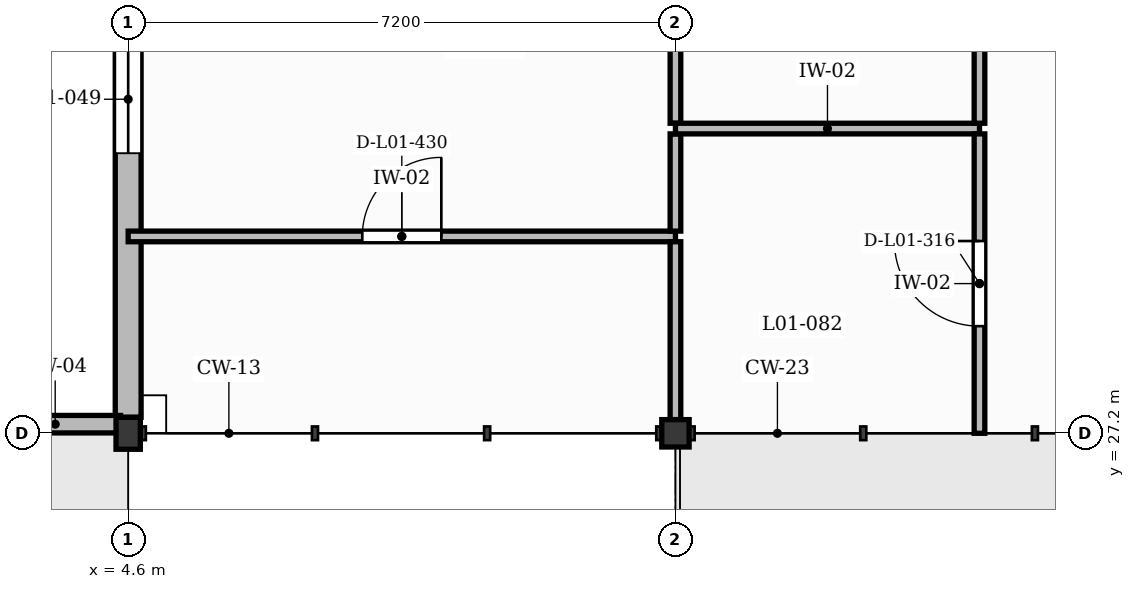
"""IFC4 building model, lengths in metres.
Left out: names, types, materials, properties, quantities, classifications, styles, units other than length and angle.
Written with IfcOpenShell. Run it as: python <this file> out.ifc"""

import sys

from ifc_helpers import new_model, si_unit, direction, frame, frame_2d, origin, origin_2d, place, context, subcontext, project, spatial, rectangle, extrude, element, fill, save


model = new_model("IFC4")
c1 = context("Model", 3, precision=1e-05, world=origin(), true_north=direction((0.0, 1.0)))
c2 = subcontext(c1, "Body", "Model", "MODEL_VIEW")
j1 = project(units=[si_unit("LENGTHUNIT", "METRE"), si_unit("PLANEANGLEUNIT", "RADIAN")], contexts=[c1])
p1 = place(None, origin())
s1 = spatial("IfcSite", under=j1, at=p1, CompositionType="ELEMENT")
p2 = place(p1, origin())
s2 = spatial("IfcBuilding", under=s1, at=p2, CompositionType="ELEMENT")
p3 = place(p2, frame((0.0, 0.0, 4.5)))
s3 = spatial("IfcBuildingStorey", under=s2, at=p3, CompositionType="ELEMENT", Elevation=4.5)
p4 = place(p3, frame((4.6, 27.2, 0.0), z_axis=(0.0, 0.0, 1.0), x_axis=(1.0, 0.0, 0.0)))
e1 = element("IfcColumn", 1, at=p4, inside=s3, PredefinedType="COLUMN", context=c2, shape_type="SweptSolid", body=[
    extrude(rectangle(XDim=0.32, YDim=0.42, at=origin_2d()), origin(), (0.0, 0.0, 1.0), 4.26),
])
p5 = place(p3, frame((11.8, 27.2, 0.0), z_axis=(0.0, 0.0, 1.0), x_axis=(1.0, 0.0, 0.0)))
e2 = element("IfcColumn", 2, at=p5, inside=s3, PredefinedType="COLUMN", context=c2, shape_type="SweptSolid", body=[
    extrude(rectangle(XDim=0.36, YDim=0.36, at=origin_2d()), origin(), (0.0, 0.0, 1.0), 4.26),
])
p6 = place(p3, frame((4.6, 27.41, 0.0), z_axis=(0.0, 0.0, 1.0), x_axis=(0.0, 1.0, 0.0)))
e3 = element("IfcWall", 3, at=p6, inside=s3, PredefinedType="SOLIDWALL", context=c2, shape_type="SweptSolid", body=[
    extrude(rectangle(XDim=9.21, YDim=0.34, at=frame_2d((4.605, 0.0))), origin(), (0.0, 0.0, 1.0), 3.8),
])
p7 = place(p6, frame((3.475, 0.0, 0.9)))
e4 = element("IfcOpeningElement", 4, at=p7, cuts=e3, PredefinedType="OPENING", context=c2, shape_type="SweptSolid", body=[
    extrude(rectangle(XDim=1.42, YDim=2.4, at=frame_2d((0.71, 1.2))), frame((0.0, 0.18, 0.0), z_axis=(0.0, -1.0, 0.0), x_axis=(1.0, 0.0, 0.0)), (0.0, 0.0, 1.0), 0.36),
])
p8 = place(p6, frame((5.575, 0.0, 0.9)))
e5 = element("IfcOpeningElement", 5, at=p8, cuts=e3, PredefinedType="OPENING", context=c2, shape_type="SweptSolid", body=[
    extrude(rectangle(XDim=1.42, YDim=2.4, at=frame_2d((0.71, 1.2))), frame((0.0, 0.18, 0.0), z_axis=(0.0, -1.0, 0.0), x_axis=(1.0, 0.0, 0.0)), (0.0, 0.0, 1.0), 0.36),
])
p9 = place(p3, frame((2.78, 27.32, -0.05), z_axis=(0.0, 0.0, 1.0), x_axis=(1.0, 0.0, 0.0)))
e6 = element("IfcWall", 6, at=p9, inside=s3, PredefinedType="PARAPET", context=c2, shape_type="SweptSolid", body=[
    extrude(rectangle(XDim=1.72, YDim=0.23, at=frame_2d((0.86, 0.0))), origin(), (0.0, 0.0, 1.0), 0.7),
])
p10 = place(p3, frame((4.6, 29.79, 0.0), z_axis=(0.0, 0.0, 1.0), x_axis=(1.0, 0.0, 0.0)))
e7 = element("IfcWall", 7, at=p10, inside=s3, PredefinedType="PARTITIONING", context=c2, shape_type="SweptSolid", body=[
    extrude(rectangle(XDim=7.2, YDim=0.14, at=frame_2d((3.6, 0.0))), origin(), (0.0, 0.0, 1.0), 4.18),
])
p11 = place(p10, frame((3.08, 0.0, 0.0)))
e8 = element("IfcOpeningElement", 8, at=p11, cuts=e7, PredefinedType="OPENING", context=c2, shape_type="SweptSolid", body=[
    extrude(rectangle(XDim=1.04, YDim=2.1, at=frame_2d((0.52, 1.05))), frame((0.0, 0.08, 0.0), z_axis=(0.0, -1.0, 0.0), x_axis=(1.0, 0.0, 0.0)), (0.0, 0.0, 1.0), 0.16),
])
p12 = place(p3, frame((11.8, 27.38, 0.0), z_axis=(0.0, 0.0, 1.0), x_axis=(0.0, 1.0, 0.0)))
e9 = element("IfcWall", 9, at=p12, inside=s3, PredefinedType="PARTITIONING", context=c2, shape_type="SweptSolid", body=[
    extrude(rectangle(XDim=2.34, YDim=0.14, at=frame_2d((1.17, 0.0))), origin(), (0.0, 0.0, 1.0), 3.62),
])
p13 = place(p3, frame((11.8, 29.86, 0.0), z_axis=(0.0, 0.0, 1.0), x_axis=(0.0, 1.0, 0.0)))
e10 = element("IfcWall", 10, at=p13, inside=s3, PredefinedType="PARTITIONING", context=c2, shape_type="SweptSolid", body=[
    extrude(rectangle(XDim=1.279, YDim=0.14, at=frame_2d((0.639, 0.0))), origin(), (0.0, 0.0, 1.0), 3.62),
])
p14 = place(p3, frame((11.8, 31.279, 0.0), z_axis=(0.0, 0.0, 1.0), x_axis=(0.0, 1.0, 0.0)))
e11 = element("IfcWall", 11, at=p14, inside=s3, PredefinedType="PARTITIONING", context=c2, shape_type="SweptSolid", body=[
    extrude(rectangle(XDim=4.151, YDim=0.14, at=frame_2d((2.075, 0.0))), origin(), (0.0, 0.0, 1.0), 3.62),
])
p15 = place(p3, frame((11.8, 31.209, 0.0), z_axis=(0.0, 0.0, 1.0), x_axis=(1.0, 0.0, 0.0)))
e12 = element("IfcWall", 12, at=p15, inside=s3, PredefinedType="PARTITIONING", context=c2, shape_type="SweptSolid", body=[
    extrude(rectangle(XDim=4.0, YDim=0.14, at=frame_2d((2.0, 0.0))), origin(), (0.0, 0.0, 1.0), 4.18),
])
p16 = place(p3, frame((15.8, 27.2, 0.0), z_axis=(0.0, 0.0, 1.0), x_axis=(0.0, 1.0, 0.0)))
e13 = element("IfcWall", 13, at=p16, inside=s3, PredefinedType="PARTITIONING", context=c2, shape_type="SweptSolid", body=[
    extrude(rectangle(XDim=3.939, YDim=0.14, at=frame_2d((1.969, 0.0))), origin(), (0.0, 0.0, 1.0), 4.18),
])
p17 = place(p16, frame((1.409, 0.0, 0.0)))
e14 = element("IfcOpeningElement", 14, at=p17, cuts=e13, PredefinedType="OPENING", context=c2, shape_type="SweptSolid", body=[
    extrude(rectangle(XDim=1.12, YDim=2.15, at=frame_2d((0.56, 1.075))), frame((0.0, 0.08, 0.0), z_axis=(0.0, -1.0, 0.0), x_axis=(1.0, 0.0, 0.0)), (0.0, 0.0, 1.0), 0.16),
])
p18 = place(p3, frame((15.8, 31.279, 0.0), z_axis=(0.0, 0.0, 1.0), x_axis=(0.0, 1.0, 0.0)))
e15 = element("IfcWall", 15, at=p18, inside=s3, PredefinedType="PARTITIONING", context=c2, shape_type="SweptSolid", body=[
    extrude(rectangle(XDim=4.151, YDim=0.14, at=frame_2d((2.075, 0.0))), origin(), (0.0, 0.0, 1.0), 4.18),
])
p19 = place(p7, origin())
e16 = element("IfcWindow", 16, at=p19, inside=s3, PartitioningType="SINGLE_PANEL", PredefinedType="WINDOW", context=c2, shape_type="SweptSolid", body=[
    extrude(rectangle(XDim=1.42, YDim=2.4, at=frame_2d((0.71, 1.2))), frame((0.0, 0.03, 0.0), z_axis=(0.0, -1.0, 0.0), x_axis=(1.0, 0.0, 0.0)), (0.0, 0.0, 1.0), 0.06),
])
fill(e4, e16)
p20 = place(p17, origin())
e17 = element("IfcDoor", 17, at=p20, inside=s3, OperationType="SINGLE_SWING_RIGHT", PredefinedType="DOOR", context=c2, shape_type="SweptSolid", body=[
    extrude(rectangle(XDim=1.12, YDim=2.15, at=frame_2d((0.56, 1.075))), frame((0.0, 0.025, 0.0), z_axis=(0.0, -1.0, 0.0), x_axis=(1.0, 0.0, 0.0)), (0.0, 0.0, 1.0), 0.05),
])
fill(e14, e17)
p21 = place(p11, origin())
e18 = element("IfcDoor", 18, at=p21, inside=s3, OperationType="SINGLE_SWING_RIGHT", PredefinedType="DOOR", context=c2, shape_type="SweptSolid", body=[
    extrude(rectangle(XDim=1.04, YDim=2.1, at=frame_2d((0.52, 1.05))), frame((0.0, 0.025, 0.0), z_axis=(0.0, -1.0, 0.0), x_axis=(1.0, 0.0, 0.0)), (0.0, 0.0, 1.0), 0.05),
])
fill(e8, e18)
save(model, sys.argv[1])
